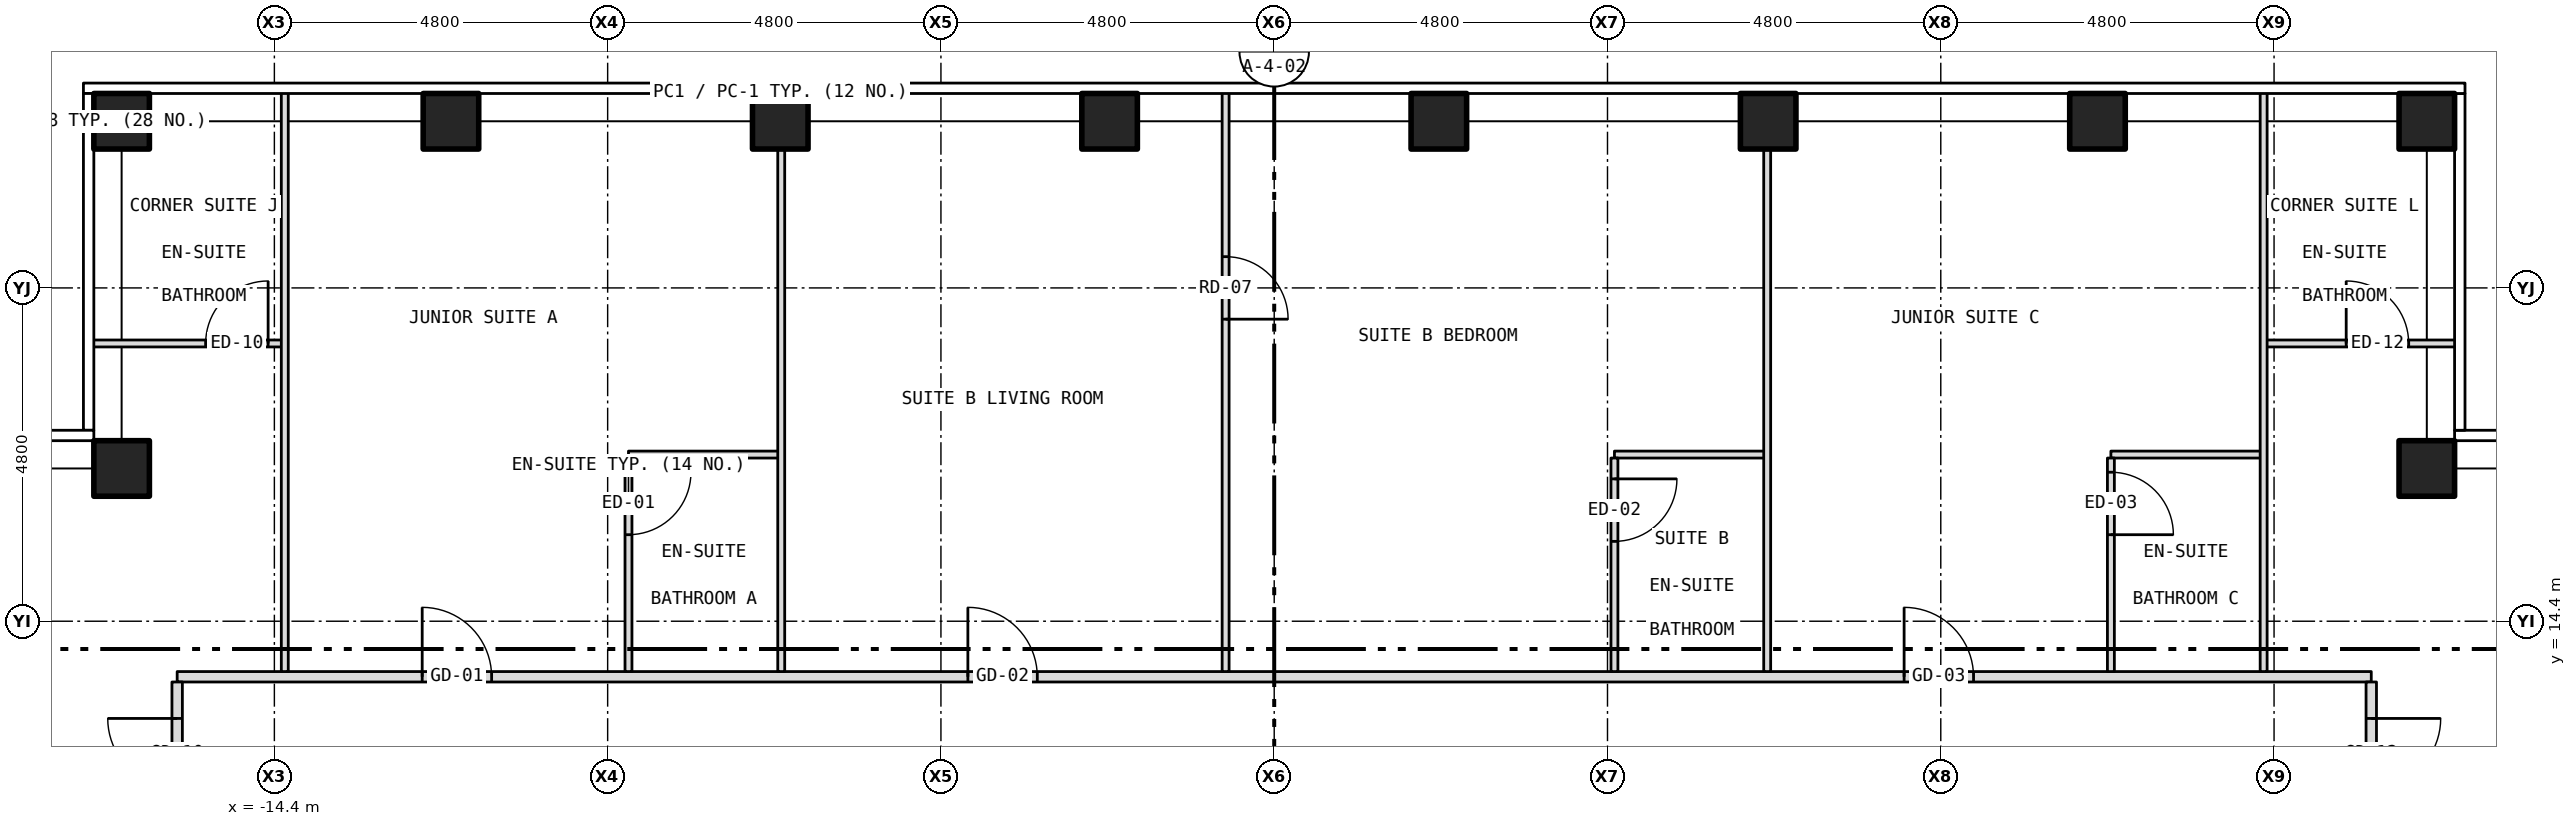
"""IFC4 building model, lengths in metres.
Left out: names, types, materials, properties, quantities, classifications, styles, units other than length and angle.
Written with IfcOpenShell. Run it as: python <this file> out.ifc"""

import sys

from ifc_helpers import new_model, si_unit, direction, frame, frame_2d, origin, origin_2d, place, context, subcontext, project, spatial, rectangle, hollow_rectangle, extrude, element, fill, save


model = new_model("IFC4")
c1 = context("Model", 3, precision=1e-05, world=origin(), true_north=direction((0.0, 1.0)))
c2 = subcontext(c1, "Body", "Model", "MODEL_VIEW")
j1 = project(units=[si_unit("LENGTHUNIT", "METRE"), si_unit("PLANEANGLEUNIT", "RADIAN")], contexts=[c1])
p1 = place(None, origin())
s1 = spatial("IfcSite", under=j1, at=p1, CompositionType="ELEMENT")
p2 = place(p1, origin())
s2 = spatial("IfcBuilding", under=s1, at=p2, CompositionType="ELEMENT")
p3 = place(p2, frame((0.0, 0.0, 148.0)))
s3 = spatial("IfcBuildingStorey", under=s2, at=p3, CompositionType="ELEMENT", Elevation=148.0)
for number, where, z_axis, x_axis in (
    (1, (-16.6, 21.6, -0.15), (0.0, 0.0, 1.0), (1.0, 0.0, 0.0)),
    (2, (-11.857, 21.6, -0.15), (0.0, 0.0, 1.0), (1.0, 0.0, 0.0)),
    (3, (-7.114, 21.6, -0.15), (0.0, 0.0, 1.0), (1.0, 0.0, 0.0)),
    (4, (-2.371, 21.6, -0.15), (0.0, 0.0, 1.0), (1.0, 0.0, 0.0)),
    (5, (2.371, 21.6, -0.15), (0.0, 0.0, 1.0), (1.0, 0.0, 0.0)),
    (6, (7.114, 21.6, -0.15), (0.0, 0.0, 1.0), (1.0, 0.0, 0.0)),
    (7, (11.857, 21.6, -0.15), (0.0, 0.0, 1.0), (1.0, 0.0, 0.0)),
    (8, (16.6, 21.6, -0.15), (0.0, 0.0, 1.0), (1.0, 0.0, 0.0)),
    (9, (-16.6, 16.6, -0.15), (0.0, 0.0, 1.0), (1.0, 0.0, 0.0)),
    (10, (16.6, 16.6, -0.15), (0.0, 0.0, 1.0), (1.0, 0.0, 0.0)),
):
    element("IfcColumn", number, at=place(p3, frame(where, z_axis=z_axis, x_axis=x_axis)), inside=s3, PredefinedType="COLUMN", context=c2, shape_type="SweptSolid", body=[
        extrude(hollow_rectangle(XDim=0.8, YDim=0.8, WallThickness=0.045, at=origin_2d()), origin(), (0.0, 0.0, 1.0), 3.5),
    ])
p4 = place(p3, frame((-15.8, 13.6, 0.0), z_axis=(0.0, 0.0, 1.0), x_axis=(1.0, 0.0, 0.0)))
e11 = element("IfcWall", 11, at=p4, inside=s3, PredefinedType="PARTITIONING", context=c2, shape_type="SweptSolid", body=[
    extrude(rectangle(XDim=31.6, YDim=0.15, at=frame_2d((15.8, 0.0))), origin(), (0.0, 0.0, 1.0), 3.35),
])
p5 = place(p4, frame((3.529, 0.0, 0.0)))
e12 = element("IfcOpeningElement", 12, at=p5, cuts=e11, PredefinedType="OPENING", context=c2, shape_type="SweptSolid", body=[
    extrude(rectangle(XDim=1.0, YDim=2.1, at=frame_2d((0.5, 1.05))), frame((0.0, 0.087, 0.0), z_axis=(0.0, -1.0, 0.0), x_axis=(1.0, 0.0, 0.0)), (0.0, 0.0, 1.0), 0.174),
])
p6 = place(p4, frame((11.388, 0.0, 0.0)))
e13 = element("IfcOpeningElement", 13, at=p6, cuts=e11, PredefinedType="OPENING", context=c2, shape_type="SweptSolid", body=[
    extrude(rectangle(XDim=1.0, YDim=2.1, at=frame_2d((0.5, 1.05))), frame((0.0, 0.087, 0.0), z_axis=(0.0, -1.0, 0.0), x_axis=(1.0, 0.0, 0.0)), (0.0, 0.0, 1.0), 0.174),
])
p7 = place(p4, frame((24.872, 0.0, 0.0)))
e14 = element("IfcOpeningElement", 14, at=p7, cuts=e11, PredefinedType="OPENING", context=c2, shape_type="SweptSolid", body=[
    extrude(rectangle(XDim=1.0, YDim=2.1, at=frame_2d((0.5, 1.05))), frame((0.0, 0.087, 0.0), z_axis=(0.0, -1.0, 0.0), x_axis=(1.0, 0.0, 0.0)), (0.0, 0.0, 1.0), 0.174),
])
p8 = place(p3, frame((-9.3, 16.8, 0.0), z_axis=(0.0, 0.0, 1.0), x_axis=(1.0, 0.0, 0.0)))
e15 = element("IfcWall", 15, at=p8, inside=s3, PredefinedType="PARTITIONING", context=c2, shape_type="SweptSolid", body=[
    extrude(rectangle(XDim=2.2, YDim=0.1, at=frame_2d((1.1, 0.0))), origin(), (0.0, 0.0, 1.0), 3.35),
])
p9 = place(p3, frame((4.9, 16.8, 0.0), z_axis=(0.0, 0.0, 1.0), x_axis=(1.0, 0.0, 0.0)))
e16 = element("IfcWall", 16, at=p9, inside=s3, PredefinedType="PARTITIONING", context=c2, shape_type="SweptSolid", body=[
    extrude(rectangle(XDim=2.2, YDim=0.1, at=frame_2d((1.1, 0.0))), origin(), (0.0, 0.0, 1.0), 3.35),
])
p10 = place(p3, frame((12.05, 16.8, 0.0), z_axis=(0.0, 0.0, 1.0), x_axis=(1.0, 0.0, 0.0)))
e17 = element("IfcWall", 17, at=p10, inside=s3, PredefinedType="PARTITIONING", context=c2, shape_type="SweptSolid", body=[
    extrude(rectangle(XDim=2.2, YDim=0.1, at=frame_2d((1.1, 0.0))), origin(), (0.0, 0.0, 1.0), 3.35),
])
p11 = place(p3, frame((-17.03, 18.4, 0.0), z_axis=(0.0, 0.0, 1.0), x_axis=(1.0, 0.0, 0.0)))
e18 = element("IfcWall", 18, at=p11, inside=s3, PredefinedType="PARTITIONING", context=c2, shape_type="SweptSolid", body=[
    extrude(rectangle(XDim=2.78, YDim=0.1, at=frame_2d((1.39, 0.0))), origin(), (0.0, 0.0, 1.0), 3.35),
])
p12 = place(p11, frame((1.64, 0.0, 0.0)))
e19 = element("IfcOpeningElement", 19, at=p12, cuts=e18, PredefinedType="OPENING", context=c2, shape_type="SweptSolid", body=[
    extrude(rectangle(XDim=0.9, YDim=2.1, at=frame_2d((0.45, 1.05))), frame((0.0, 0.062, 0.0), z_axis=(0.0, -1.0, 0.0), x_axis=(1.0, 0.0, 0.0)), (0.0, 0.0, 1.0), 0.124),
])
p13 = place(p3, frame((14.25, 18.4, 0.0), z_axis=(0.0, 0.0, 1.0), x_axis=(1.0, 0.0, 0.0)))
e20 = element("IfcWall", 20, at=p13, inside=s3, PredefinedType="PARTITIONING", context=c2, shape_type="SweptSolid", body=[
    extrude(rectangle(XDim=2.78, YDim=0.1, at=frame_2d((1.39, 0.0))), origin(), (0.0, 0.0, 1.0), 3.35),
])
p14 = place(p13, frame((1.189, 0.0, 0.0)))
e21 = element("IfcOpeningElement", 21, at=p14, cuts=e20, PredefinedType="OPENING", context=c2, shape_type="SweptSolid", body=[
    extrude(rectangle(XDim=0.9, YDim=2.1, at=frame_2d((0.45, 1.05))), frame((0.0, 0.062, 0.0), z_axis=(0.0, -1.0, 0.0), x_axis=(1.0, 0.0, 0.0)), (0.0, 0.0, 1.0), 0.124),
])
p15 = place(p3, frame((-15.8, 10.92, 0.0), z_axis=(0.0, 0.0, 1.0), x_axis=(0.0, 1.0, 0.0)))
e22 = element("IfcWall", 22, at=p15, inside=s3, PredefinedType="PARTITIONING", context=c2, shape_type="SweptSolid", body=[
    extrude(rectangle(XDim=2.605, YDim=0.15, at=frame_2d((1.302, 0.0))), origin(), (0.0, 0.0, 1.0), 3.35),
])
p16 = place(p15, frame((1.08, 0.0, 0.0)))
e23 = element("IfcOpeningElement", 23, at=p16, cuts=e22, PredefinedType="OPENING", context=c2, shape_type="SweptSolid", body=[
    extrude(rectangle(XDim=1.0, YDim=2.1, at=frame_2d((0.5, 1.05))), frame((0.0, 0.087, 0.0), z_axis=(0.0, -1.0, 0.0), x_axis=(1.0, 0.0, 0.0)), (0.0, 0.0, 1.0), 0.174),
])
p17 = place(p3, frame((-14.25, 13.675, 0.0), z_axis=(0.0, 0.0, 1.0), x_axis=(0.0, 1.0, 0.0)))
e24 = element("IfcWall", 24, at=p17, inside=s3, PredefinedType="PARTITIONING", context=c2, shape_type="SweptSolid", body=[
    extrude(rectangle(XDim=8.355, YDim=0.1, at=frame_2d((4.177, 0.0))), origin(), (0.0, 0.0, 1.0), 2.817),
])
p18 = place(p3, frame((-9.3, 13.675, 0.0), z_axis=(0.0, 0.0, 1.0), x_axis=(0.0, 1.0, 0.0)))
e25 = element("IfcWall", 25, at=p18, inside=s3, PredefinedType="PARTITIONING", context=c2, shape_type="SweptSolid", body=[
    extrude(rectangle(XDim=3.075, YDim=0.1, at=frame_2d((1.538, 0.0))), origin(), (0.0, 0.0, 1.0), 3.35),
])
p19 = place(p18, frame((1.971, 0.0, 0.0)))
e26 = element("IfcOpeningElement", 26, at=p19, cuts=e25, PredefinedType="OPENING", context=c2, shape_type="SweptSolid", body=[
    extrude(rectangle(XDim=0.9, YDim=2.1, at=frame_2d((0.45, 1.05))), frame((0.0, 0.062, 0.0), z_axis=(0.0, -1.0, 0.0), x_axis=(1.0, 0.0, 0.0)), (0.0, 0.0, 1.0), 0.124),
])
p20 = place(p3, frame((-7.1, 13.675, 0.0), z_axis=(0.0, 0.0, 1.0), x_axis=(0.0, 1.0, 0.0)))
e27 = element("IfcWall", 27, at=p20, inside=s3, PredefinedType="PARTITIONING", context=c2, shape_type="SweptSolid", body=[
    extrude(rectangle(XDim=7.805, YDim=0.1, at=frame_2d((3.902, 0.0))), origin(), (0.0, 0.0, 1.0), 3.35),
])
p21 = place(p3, frame((-0.7, 13.675, 0.0), z_axis=(0.0, 0.0, 1.0), x_axis=(0.0, 1.0, 0.0)))
e28 = element("IfcWall", 28, at=p21, inside=s3, PredefinedType="PARTITIONING", context=c2, shape_type="SweptSolid", body=[
    extrude(rectangle(XDim=8.355, YDim=0.1, at=frame_2d((4.177, 0.0))), origin(), (0.0, 0.0, 1.0), 3.35),
])
p22 = place(p21, frame((5.075, 0.0, 0.0)))
e29 = element("IfcOpeningElement", 29, at=p22, cuts=e28, PredefinedType="OPENING", context=c2, shape_type="SweptSolid", body=[
    extrude(rectangle(XDim=0.9, YDim=2.1, at=frame_2d((0.45, 1.05))), frame((0.0, 0.062, 0.0), z_axis=(0.0, -1.0, 0.0), x_axis=(1.0, 0.0, 0.0)), (0.0, 0.0, 1.0), 0.124),
])
p23 = place(p3, frame((4.9, 13.675, 0.0), z_axis=(0.0, 0.0, 1.0), x_axis=(0.0, 1.0, 0.0)))
e30 = element("IfcWall", 30, at=p23, inside=s3, PredefinedType="PARTITIONING", context=c2, shape_type="SweptSolid", body=[
    extrude(rectangle(XDim=3.075, YDim=0.1, at=frame_2d((1.538, 0.0))), origin(), (0.0, 0.0, 1.0), 2.817),
])
p24 = place(p23, frame((1.875, 0.0, 0.0)))
e31 = element("IfcOpeningElement", 31, at=p24, cuts=e30, PredefinedType="OPENING", context=c2, shape_type="SweptSolid", body=[
    extrude(rectangle(XDim=0.9, YDim=2.1, at=frame_2d((0.45, 1.05))), frame((0.0, 0.062, 0.0), z_axis=(0.0, -1.0, 0.0), x_axis=(1.0, 0.0, 0.0)), (0.0, 0.0, 1.0), 0.124),
])
p25 = place(p3, frame((7.1, 13.675, 0.0), z_axis=(0.0, 0.0, 1.0), x_axis=(0.0, 1.0, 0.0)))
e32 = element("IfcWall", 32, at=p25, inside=s3, PredefinedType="PARTITIONING", context=c2, shape_type="SweptSolid", body=[
    extrude(rectangle(XDim=7.805, YDim=0.1, at=frame_2d((3.902, 0.0))), origin(), (0.0, 0.0, 1.0), 3.35),
])
p26 = place(p3, frame((12.05, 13.675, 0.0), z_axis=(0.0, 0.0, 1.0), x_axis=(0.0, 1.0, 0.0)))
e33 = element("IfcWall", 33, at=p26, inside=s3, PredefinedType="PARTITIONING", context=c2, shape_type="SweptSolid", body=[
    extrude(rectangle(XDim=3.075, YDim=0.1, at=frame_2d((1.538, 0.0))), origin(), (0.0, 0.0, 1.0), 3.35),
])
p27 = place(p26, frame((1.971, 0.0, 0.0)))
e34 = element("IfcOpeningElement", 34, at=p27, cuts=e33, PredefinedType="OPENING", context=c2, shape_type="SweptSolid", body=[
    extrude(rectangle(XDim=0.9, YDim=2.1, at=frame_2d((0.45, 1.05))), frame((0.0, 0.062, 0.0), z_axis=(0.0, -1.0, 0.0), x_axis=(1.0, 0.0, 0.0)), (0.0, 0.0, 1.0), 0.124),
])
p28 = place(p3, frame((14.25, 13.675, 0.0), z_axis=(0.0, 0.0, 1.0), x_axis=(0.0, 1.0, 0.0)))
e35 = element("IfcWall", 35, at=p28, inside=s3, PredefinedType="PARTITIONING", context=c2, shape_type="SweptSolid", body=[
    extrude(rectangle(XDim=8.355, YDim=0.1, at=frame_2d((4.177, 0.0))), origin(), (0.0, 0.0, 1.0), 2.817),
])
p29 = place(p3, frame((15.8, 10.92, 0.0), z_axis=(0.0, 0.0, 1.0), x_axis=(0.0, 1.0, 0.0)))
e36 = element("IfcWall", 36, at=p29, inside=s3, PredefinedType="PARTITIONING", context=c2, shape_type="SweptSolid", body=[
    extrude(rectangle(XDim=2.605, YDim=0.15, at=frame_2d((1.302, 0.0))), origin(), (0.0, 0.0, 1.0), 3.35),
])
p30 = place(p29, frame((1.08, 0.0, 0.0)))
e37 = element("IfcOpeningElement", 37, at=p30, cuts=e36, PredefinedType="OPENING", context=c2, shape_type="SweptSolid", body=[
    extrude(rectangle(XDim=1.0, YDim=2.1, at=frame_2d((0.5, 1.05))), frame((0.0, 0.087, 0.0), z_axis=(0.0, -1.0, 0.0), x_axis=(1.0, 0.0, 0.0)), (0.0, 0.0, 1.0), 0.174),
])
p31 = place(p5, origin())
e38 = element("IfcDoor", 38, at=p31, inside=s3, OperationType="SINGLE_SWING_LEFT", PredefinedType="DOOR", context=c2, shape_type="SweptSolid", body=[
    extrude(rectangle(XDim=1.0, YDim=2.1, at=frame_2d((0.5, 1.05))), frame((0.0, 0.025, 0.0), z_axis=(0.0, -1.0, 0.0), x_axis=(1.0, 0.0, 0.0)), (0.0, 0.0, 1.0), 0.05),
])
fill(e12, e38)
p32 = place(p19, origin())
e39 = element("IfcDoor", 39, at=p32, inside=s3, OperationType="SINGLE_SWING_RIGHT", PredefinedType="DOOR", context=c2, shape_type="SweptSolid", body=[
    extrude(rectangle(XDim=0.9, YDim=2.1, at=frame_2d((0.45, 1.05))), frame((0.0, 0.025, 0.0), z_axis=(0.0, -1.0, 0.0), x_axis=(1.0, 0.0, 0.0)), (0.0, 0.0, 1.0), 0.05),
])
fill(e26, e39)
p33 = place(p6, origin())
e40 = element("IfcDoor", 40, at=p33, inside=s3, OperationType="SINGLE_SWING_LEFT", PredefinedType="DOOR", context=c2, shape_type="SweptSolid", body=[
    extrude(rectangle(XDim=1.0, YDim=2.1, at=frame_2d((0.5, 1.05))), frame((0.0, 0.025, 0.0), z_axis=(0.0, -1.0, 0.0), x_axis=(1.0, 0.0, 0.0)), (0.0, 0.0, 1.0), 0.05),
])
fill(e13, e40)
p34 = place(p22, origin())
e41 = element("IfcDoor", 41, at=p34, inside=s3, OperationType="SINGLE_SWING_LEFT", PredefinedType="DOOR", context=c2, shape_type="SweptSolid", body=[
    extrude(rectangle(XDim=0.9, YDim=2.1, at=frame_2d((0.45, 1.05))), frame((0.0, 0.025, 0.0), z_axis=(0.0, -1.0, 0.0), x_axis=(1.0, 0.0, 0.0)), (0.0, 0.0, 1.0), 0.05),
])
fill(e29, e41)
p35 = place(p24, origin())
e42 = element("IfcDoor", 42, at=p35, inside=s3, OperationType="SINGLE_SWING_RIGHT", PredefinedType="DOOR", context=c2, shape_type="SweptSolid", body=[
    extrude(rectangle(XDim=0.9, YDim=2.1, at=frame_2d((0.45, 1.05))), frame((0.0, 0.025, 0.0), z_axis=(0.0, -1.0, 0.0), x_axis=(1.0, 0.0, 0.0)), (0.0, 0.0, 1.0), 0.05),
])
fill(e31, e42)
p36 = place(p7, origin())
e43 = element("IfcDoor", 43, at=p36, inside=s3, OperationType="SINGLE_SWING_LEFT", PredefinedType="DOOR", context=c2, shape_type="SweptSolid", body=[
    extrude(rectangle(XDim=1.0, YDim=2.1, at=frame_2d((0.5, 1.05))), frame((0.0, 0.025, 0.0), z_axis=(0.0, -1.0, 0.0), x_axis=(1.0, 0.0, 0.0)), (0.0, 0.0, 1.0), 0.05),
])
fill(e14, e43)
p37 = place(p27, origin())
e44 = element("IfcDoor", 44, at=p37, inside=s3, OperationType="SINGLE_SWING_LEFT", PredefinedType="DOOR", context=c2, shape_type="SweptSolid", body=[
    extrude(rectangle(XDim=0.9, YDim=2.1, at=frame_2d((0.45, 1.05))), frame((0.0, 0.025, 0.0), z_axis=(0.0, -1.0, 0.0), x_axis=(1.0, 0.0, 0.0)), (0.0, 0.0, 1.0), 0.05),
])
fill(e34, e44)
p38 = place(p12, origin())
e45 = element("IfcDoor", 45, at=p38, inside=s3, OperationType="SINGLE_SWING_RIGHT", PredefinedType="DOOR", context=c2, shape_type="SweptSolid", body=[
    extrude(rectangle(XDim=0.9, YDim=2.1, at=frame_2d((0.45, 1.05))), frame((0.0, 0.025, 0.0), z_axis=(0.0, -1.0, 0.0), x_axis=(1.0, 0.0, 0.0)), (0.0, 0.0, 1.0), 0.05),
])
fill(e19, e45)
p39 = place(p16, origin())
e46 = element("IfcDoor", 46, at=p39, inside=s3, OperationType="SINGLE_SWING_RIGHT", PredefinedType="DOOR", context=c2, shape_type="SweptSolid", body=[
    extrude(rectangle(XDim=1.0, YDim=2.1, at=frame_2d((0.5, 1.05))), frame((0.0, 0.025, 0.0), z_axis=(0.0, -1.0, 0.0), x_axis=(1.0, 0.0, 0.0)), (0.0, 0.0, 1.0), 0.05),
])
fill(e23, e46)
p40 = place(p14, origin())
e47 = element("IfcDoor", 47, at=p40, inside=s3, OperationType="SINGLE_SWING_LEFT", PredefinedType="DOOR", context=c2, shape_type="SweptSolid", body=[
    extrude(rectangle(XDim=0.9, YDim=2.1, at=frame_2d((0.45, 1.05))), frame((0.0, 0.025, 0.0), z_axis=(0.0, -1.0, 0.0), x_axis=(1.0, 0.0, 0.0)), (0.0, 0.0, 1.0), 0.05),
])
fill(e21, e47)
p41 = place(p30, origin())
e48 = element("IfcDoor", 48, at=p41, inside=s3, OperationType="SINGLE_SWING_RIGHT", PredefinedType="DOOR", context=c2, shape_type="SweptSolid", body=[
    extrude(rectangle(XDim=1.0, YDim=2.1, at=frame_2d((0.5, 1.05))), frame((0.0, 0.025, 0.0), z_axis=(0.0, -1.0, 0.0), x_axis=(1.0, 0.0, 0.0)), (0.0, 0.0, 1.0), 0.05),
])
fill(e37, e48)
save(model, sys.argv[1])
